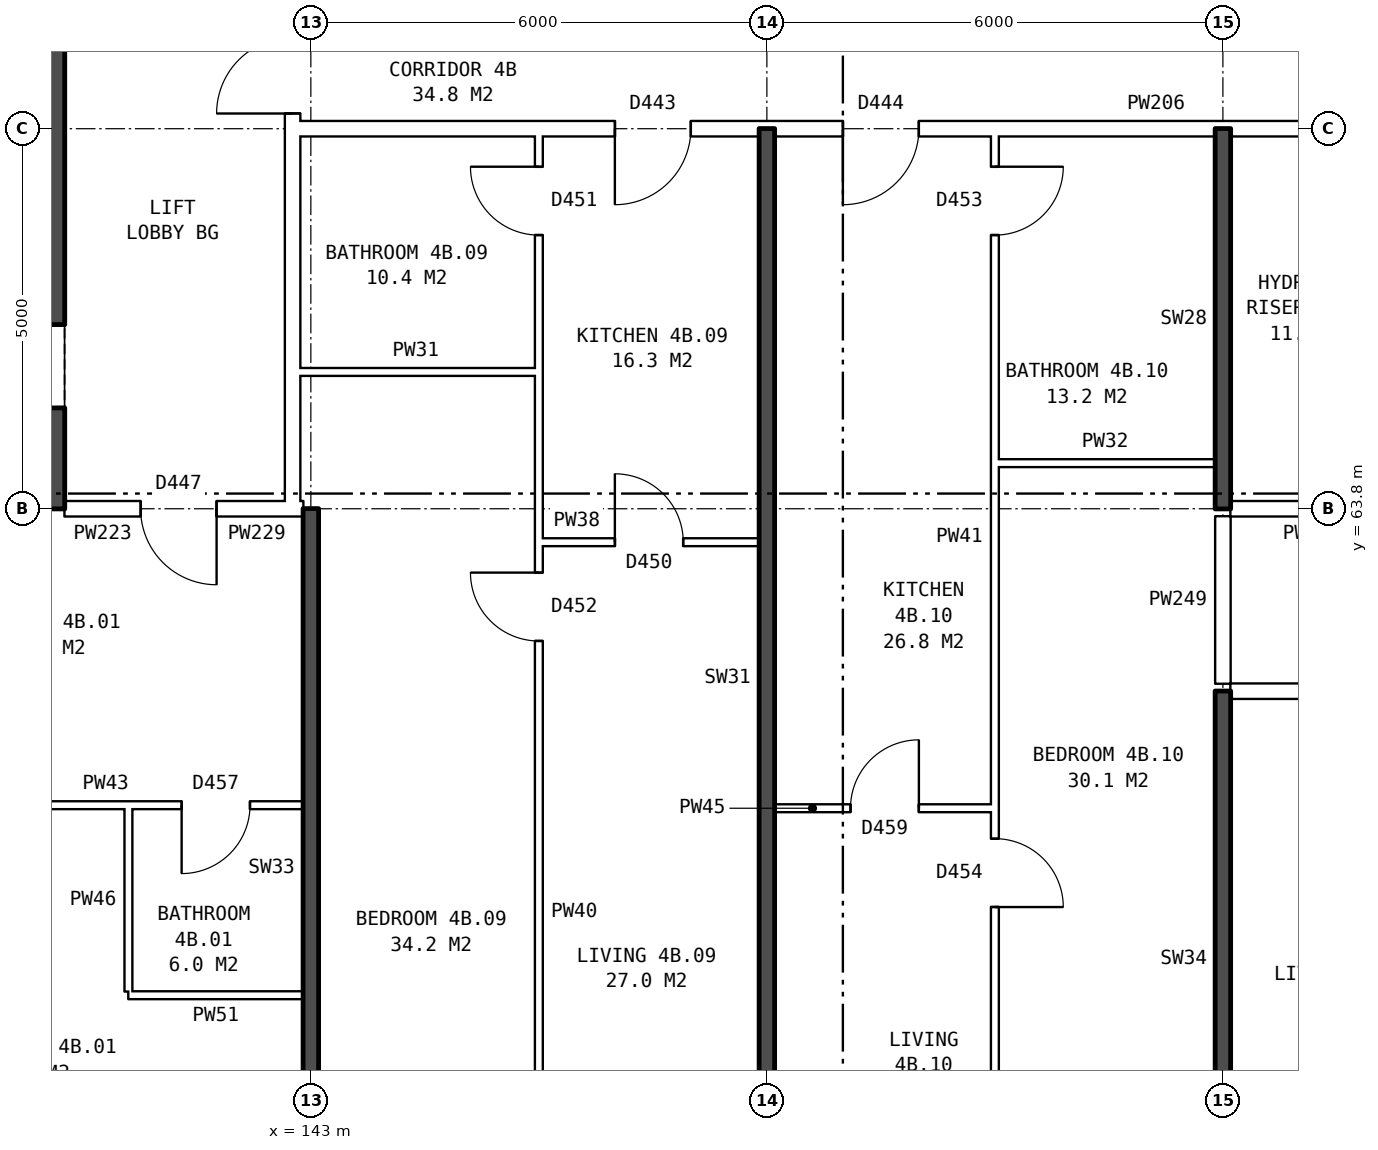
"""IFC4 building model, lengths in metres.
Left out: names, types, materials, properties, quantities, classifications, styles, units other than length and angle.
Written with IfcOpenShell. Run it as: python <this file> out.ifc"""

import sys

from ifc_helpers import new_model, si_unit, direction, frame, frame_2d, origin, place, context, subcontext, project, spatial, rectangle, extrude, element, fill, save


model = new_model("IFC4")
c1 = context("Model", 3, precision=1e-05, world=origin(), true_north=direction((0.0, 1.0)))
c2 = subcontext(c1, "Body", "Model", "MODEL_VIEW")
j1 = project(units=[si_unit("LENGTHUNIT", "METRE"), si_unit("PLANEANGLEUNIT", "RADIAN")], contexts=[c1])
p1 = place(None, origin())
s1 = spatial("IfcSite", under=j1, at=p1, CompositionType="ELEMENT")
p2 = place(p1, origin())
s2 = spatial("IfcBuilding", under=s1, at=p2, CompositionType="ELEMENT")
p3 = place(p2, frame((0.0, 0.0, 19.5)))
s3 = spatial("IfcBuildingStorey", under=s2, at=p3, CompositionType="ELEMENT", Elevation=19.5)
p4 = place(p3, frame((139.31, 64.7, 0.0), z_axis=(0.0, 0.0, 1.0), x_axis=(0.0, 1.0, 0.0)))
e1 = element("IfcWall", 1, at=p4, inside=s3, PredefinedType="SHEAR", context=c2, shape_type="SweptSolid", body=[
    extrude(rectangle(XDim=10.6, YDim=0.9, at=frame_2d((5.3, 0.0))), origin(), (0.0, 0.0, 1.0), 2.85),
])
p5 = place(p4, frame((0.425, 0.0, 0.0)))
e2 = element("IfcOpeningElement", 2, at=p5, cuts=e1, PredefinedType="OPENING", context=c2, shape_type="SweptSolid", body=[
    extrude(rectangle(XDim=1.1, YDim=2.1, at=frame_2d((0.55, 1.05))), frame((0.0, 0.46, 0.0), z_axis=(0.0, -1.0, 0.0), x_axis=(1.0, 0.0, 0.0)), (0.0, 0.0, 1.0), 0.92),
])
p6 = place(p4, frame((9.0, 0.0, 0.0)))
e3 = element("IfcOpeningElement", 3, at=p6, cuts=e1, PredefinedType="OPENING", context=c2, shape_type="SweptSolid", body=[
    extrude(rectangle(XDim=1.1, YDim=2.1, at=frame_2d((0.55, 1.05))), frame((0.0, 0.46, 0.0), z_axis=(0.0, -1.0, 0.0), x_axis=(1.0, 0.0, 0.0)), (0.0, 0.0, 1.0), 0.92),
])
p7 = place(p4, frame((7.225, 0.0, 0.0)))
e4 = element("IfcOpeningElement", 4, at=p7, cuts=e1, PredefinedType="OPENING", context=c2, shape_type="SweptSolid", body=[
    extrude(rectangle(XDim=0.85, YDim=2.1, at=frame_2d((0.425, 1.05))), frame((0.0, 0.46, 0.0), z_axis=(0.0, -1.0, 0.0), x_axis=(1.0, 0.0, 0.0)), (0.0, 0.0, 1.0), 0.92),
])
p8 = place(p3, frame((139.76, 64.25, 0.0), z_axis=(0.0, 0.0, 1.0), x_axis=(-1.0, 0.0, 0.0)))
e5 = element("IfcWall", 5, at=p8, inside=s3, PredefinedType="SHEAR", context=c2, shape_type="SweptSolid", body=[
    extrude(rectangle(XDim=8.4, YDim=0.9, at=frame_2d((4.2, 0.0))), origin(), (0.0, 0.0, 1.0), 2.85),
])
p9 = place(p3, frame((142.76, 63.9, 0.0), z_axis=(0.0, 0.0, 1.0), x_axis=(0.0, 1.0, 0.0)))
e6 = element("IfcWall", 6, at=p9, inside=s3, PredefinedType="PARTITIONING", context=c2, shape_type="SweptSolid", body=[
    extrude(rectangle(XDim=12.2, YDim=0.2, at=frame_2d((6.1, 0.0))), origin(), (0.0, 0.0, 1.0), 2.85),
])
p10 = place(p9, frame((5.1, 0.0, 0.0)))
e7 = element("IfcOpeningElement", 7, at=p10, cuts=e6, PredefinedType="OPENING", context=c2, shape_type="SweptSolid", body=[
    extrude(rectangle(XDim=2.0, YDim=2.1, at=frame_2d((1.0, 1.05))), frame((0.0, 0.11, 0.0), z_axis=(0.0, -1.0, 0.0), x_axis=(1.0, 0.0, 0.0)), (0.0, 0.0, 1.0), 0.22),
])
p11 = place(p3, frame((140.6, 57.4, 0.0), z_axis=(0.0, 0.0, 1.0), x_axis=(1.0, 0.0, 0.0)))
e8 = element("IfcWall", 8, at=p11, inside=s3, PredefinedType="PARTITIONING", context=c2, shape_type="SweptSolid", body=[
    extrude(rectangle(XDim=2.3, YDim=0.1, at=frame_2d((1.15, 0.0))), origin(), (0.0, 0.0, 1.0), 2.85),
])
p12 = place(p3, frame((149.1, 59.86, 0.0), z_axis=(0.0, 0.0, 1.0), x_axis=(1.0, 0.0, 0.0)))
e9 = element("IfcWall", 9, at=p12, inside=s3, PredefinedType="PARTITIONING", context=c2, shape_type="SweptSolid", body=[
    extrude(rectangle(XDim=2.9, YDim=0.1, at=frame_2d((1.45, 0.0))), origin(), (0.0, 0.0, 1.0), 2.85),
])
p13 = place(p12, frame((1.0, 0.0, 0.0)))
e10 = element("IfcOpeningElement", 10, at=p13, cuts=e9, PredefinedType="OPENING", context=c2, shape_type="SweptSolid", body=[
    extrude(rectangle(XDim=0.9, YDim=2.1, at=frame_2d((0.45, 1.05))), frame((0.0, 0.06, 0.0), z_axis=(0.0, -1.0, 0.0), x_axis=(1.0, 0.0, 0.0)), (0.0, 0.0, 1.0), 0.12),
])
p14 = place(p3, frame((137.1, 59.9, 0.0), z_axis=(0.0, 0.0, 1.0), x_axis=(1.0, 0.0, 0.0)))
e11 = element("IfcWall", 11, at=p14, inside=s3, PredefinedType="PARTITIONING", context=c2, shape_type="SweptSolid", body=[
    extrude(rectangle(XDim=5.8, YDim=0.1, at=frame_2d((2.9, 0.0))), origin(), (0.0, 0.0, 1.0), 2.85),
])
p15 = place(p14, frame((1.3, 0.0, 0.0)))
e12 = element("IfcOpeningElement", 12, at=p15, cuts=e11, PredefinedType="OPENING", context=c2, shape_type="SweptSolid", body=[
    extrude(rectangle(XDim=0.9, YDim=2.1, at=frame_2d((0.45, 1.05))), frame((0.0, 0.06, 0.0), z_axis=(0.0, -1.0, 0.0), x_axis=(1.0, 0.0, 0.0)), (0.0, 0.0, 1.0), 0.12),
])
p16 = place(p14, frame((4.2, 0.0, 0.0)))
e13 = element("IfcOpeningElement", 13, at=p16, cuts=e11, PredefinedType="OPENING", context=c2, shape_type="SweptSolid", body=[
    extrude(rectangle(XDim=0.9, YDim=2.1, at=frame_2d((0.45, 1.05))), frame((0.0, 0.06, 0.0), z_axis=(0.0, -1.0, 0.0), x_axis=(1.0, 0.0, 0.0)), (0.0, 0.0, 1.0), 0.12),
])
p17 = place(p3, frame((155.1, 61.4, 0.0), z_axis=(0.0, 0.0, 1.0), x_axis=(1.0, 0.0, 0.0)))
e14 = element("IfcWall", 14, at=p17, inside=s3, PredefinedType="PARTITIONING", context=c2, shape_type="SweptSolid", body=[
    extrude(rectangle(XDim=22.29, YDim=0.2, at=frame_2d((11.145, 0.0))), origin(), (0.0, 0.0, 1.0), 2.85),
])
p18 = place(p17, frame((2.45, 0.0, 0.0)))
e15 = element("IfcOpeningElement", 15, at=p18, cuts=e14, PredefinedType="OPENING", context=c2, shape_type="SweptSolid", body=[
    extrude(rectangle(XDim=1.0, YDim=2.1, at=frame_2d((0.5, 1.05))), frame((0.0, 0.11, 0.0), z_axis=(0.0, -1.0, 0.0), x_axis=(1.0, 0.0, 0.0)), (0.0, 0.0, 1.0), 0.22),
])
p19 = place(p17, frame((14.4, 0.0, 0.0)))
e16 = element("IfcOpeningElement", 16, at=p19, cuts=e14, PredefinedType="OPENING", context=c2, shape_type="SweptSolid", body=[
    extrude(rectangle(XDim=1.0, YDim=2.1, at=frame_2d((0.5, 1.05))), frame((0.0, 0.11, 0.0), z_axis=(0.0, -1.0, 0.0), x_axis=(1.0, 0.0, 0.0)), (0.0, 0.0, 1.0), 0.22),
])
p20 = place(p3, frame((146.0, 63.36, 0.0), z_axis=(0.0, 0.0, 1.0), x_axis=(1.0, 0.0, 0.0)))
e17 = element("IfcWall", 17, at=p20, inside=s3, PredefinedType="PARTITIONING", context=c2, shape_type="SweptSolid", body=[
    extrude(rectangle(XDim=2.9, YDim=0.1, at=frame_2d((1.45, 0.0))), origin(), (0.0, 0.0, 1.0), 2.85),
])
p21 = place(p20, frame((1.0, 0.0, 0.0)))
e18 = element("IfcOpeningElement", 18, at=p21, cuts=e17, PredefinedType="OPENING", context=c2, shape_type="SweptSolid", body=[
    extrude(rectangle(XDim=0.9, YDim=2.1, at=frame_2d((0.45, 1.05))), frame((0.0, 0.06, 0.0), z_axis=(0.0, -1.0, 0.0), x_axis=(1.0, 0.0, 0.0)), (0.0, 0.0, 1.0), 0.12),
])
p22 = place(p3, frame((139.76, 63.8, 0.0), z_axis=(0.0, 0.0, 1.0), x_axis=(1.0, 0.0, 0.0)))
e19 = element("IfcWall", 19, at=p22, inside=s3, PredefinedType="PARTITIONING", context=c2, shape_type="SweptSolid", body=[
    extrude(rectangle(XDim=3.0, YDim=0.2, at=frame_2d((1.5, 0.0))), origin(), (0.0, 0.0, 1.0), 2.85),
])
p23 = place(p22, frame((1.0, 0.0, 0.0)))
e20 = element("IfcOpeningElement", 20, at=p23, cuts=e19, PredefinedType="OPENING", context=c2, shape_type="SweptSolid", body=[
    extrude(rectangle(XDim=1.0, YDim=2.1, at=frame_2d((0.5, 1.05))), frame((0.0, 0.11, 0.0), z_axis=(0.0, -1.0, 0.0), x_axis=(1.0, 0.0, 0.0)), (0.0, 0.0, 1.0), 0.22),
])
p24 = place(p3, frame((142.76, 63.8, 0.0), z_axis=(0.0, 0.0, 1.0), x_axis=(1.0, 0.0, 0.0)))
e21 = element("IfcWall", 21, at=p24, inside=s3, PredefinedType="PARTITIONING", context=c2, shape_type="SweptSolid", body=[
    extrude(rectangle(XDim=0.14, YDim=0.2, at=frame_2d((0.07, 0.0))), origin(), (0.0, 0.0, 1.0), 2.85),
])
p25 = place(p3, frame((155.1, 63.8, 0.0), z_axis=(0.0, 0.0, 1.0), x_axis=(1.0, 0.0, 0.0)))
e22 = element("IfcWall", 22, at=p25, inside=s3, PredefinedType="PARTITIONING", context=c2, shape_type="SweptSolid", body=[
    extrude(rectangle(XDim=2.14, YDim=0.2, at=frame_2d((1.07, 0.0))), origin(), (0.0, 0.0, 1.0), 2.85),
])
p26 = place(p3, frame((152.0, 64.4, 0.0), z_axis=(0.0, 0.0, 1.0), x_axis=(1.0, 0.0, 0.0)))
e23 = element("IfcWall", 23, at=p26, inside=s3, PredefinedType="PARTITIONING", context=c2, shape_type="SweptSolid", body=[
    extrude(rectangle(XDim=2.9, YDim=0.1, at=frame_2d((1.45, 0.0))), origin(), (0.0, 0.0, 1.0), 2.85),
])
p27 = place(p3, frame((142.76, 65.6, 0.0), z_axis=(0.0, 0.0, 1.0), x_axis=(1.0, 0.0, 0.0)))
e24 = element("IfcWall", 24, at=p27, inside=s3, PredefinedType="PARTITIONING", context=c2, shape_type="SweptSolid", body=[
    extrude(rectangle(XDim=3.24, YDim=0.1, at=frame_2d((1.62, 0.0))), origin(), (0.0, 0.0, 1.0), 2.85),
])
p28 = place(p3, frame((142.76, 68.8, 0.0), z_axis=(0.0, 0.0, 1.0), x_axis=(1.0, 0.0, 0.0)))
e25 = element("IfcWall", 25, at=p28, inside=s3, PredefinedType="PARTITIONING", context=c2, shape_type="SweptSolid", body=[
    extrude(rectangle(XDim=14.48, YDim=0.2, at=frame_2d((7.24, 0.0))), origin(), (0.0, 0.0, 1.0), 2.85),
])
p29 = place(p28, frame((4.24, 0.0, 0.0)))
e26 = element("IfcOpeningElement", 26, at=p29, cuts=e25, PredefinedType="OPENING", context=c2, shape_type="SweptSolid", body=[
    extrude(rectangle(XDim=1.0, YDim=2.1, at=frame_2d((0.5, 1.05))), frame((0.0, 0.11, 0.0), z_axis=(0.0, -1.0, 0.0), x_axis=(1.0, 0.0, 0.0)), (0.0, 0.0, 1.0), 0.22),
])
p30 = place(p28, frame((7.24, 0.0, 0.0)))
e27 = element("IfcOpeningElement", 27, at=p30, cuts=e25, PredefinedType="OPENING", context=c2, shape_type="SweptSolid", body=[
    extrude(rectangle(XDim=1.0, YDim=2.1, at=frame_2d((0.5, 1.05))), frame((0.0, 0.11, 0.0), z_axis=(0.0, -1.0, 0.0), x_axis=(1.0, 0.0, 0.0)), (0.0, 0.0, 1.0), 0.22),
])
p31 = place(p3, frame((140.6, 57.45, 0.0), z_axis=(0.0, 0.0, 1.0), x_axis=(0.0, 1.0, 0.0)))
e28 = element("IfcWall", 28, at=p31, inside=s3, PredefinedType="PARTITIONING", context=c2, shape_type="SweptSolid", body=[
    extrude(rectangle(XDim=2.4, YDim=0.1, at=frame_2d((1.2, 0.0))), origin(), (0.0, 0.0, 1.0), 2.85),
])
p32 = place(p3, frame((143.0, 54.36, 0.0), z_axis=(0.0, 0.0, 1.0), x_axis=(0.0, 1.0, 0.0)))
e29 = element("IfcWall", 29, at=p32, inside=s3, PredefinedType="SOLIDWALL", context=c2, shape_type="SweptSolid", body=[
    extrude(rectangle(XDim=9.44, YDim=0.2, at=frame_2d((4.72, 0.0))), origin(), (0.0, 0.0, 1.0), 2.85),
])
p33 = place(p3, frame((146.0, 54.36, 0.0), z_axis=(0.0, 0.0, 1.0), x_axis=(0.0, 1.0, 0.0)))
e30 = element("IfcWall", 30, at=p33, inside=s3, PredefinedType="PARTITIONING", context=c2, shape_type="SweptSolid", body=[
    extrude(rectangle(XDim=14.34, YDim=0.1, at=frame_2d((7.17, 0.0))), origin(), (0.0, 0.0, 1.0), 2.85),
])
p34 = place(p33, frame((7.7, 0.0, 0.0)))
e31 = element("IfcOpeningElement", 31, at=p34, cuts=e30, PredefinedType="OPENING", context=c2, shape_type="SweptSolid", body=[
    extrude(rectangle(XDim=0.9, YDim=2.1, at=frame_2d((0.45, 1.05))), frame((0.0, 0.06, 0.0), z_axis=(0.0, -1.0, 0.0), x_axis=(1.0, 0.0, 0.0)), (0.0, 0.0, 1.0), 0.12),
])
p35 = place(p33, frame((13.04, 0.0, 0.0)))
e32 = element("IfcOpeningElement", 32, at=p35, cuts=e30, PredefinedType="OPENING", context=c2, shape_type="SweptSolid", body=[
    extrude(rectangle(XDim=0.9, YDim=2.1, at=frame_2d((0.45, 1.05))), frame((0.0, 0.06, 0.0), z_axis=(0.0, -1.0, 0.0), x_axis=(1.0, 0.0, 0.0)), (0.0, 0.0, 1.0), 0.12),
])
p36 = place(p3, frame((149.0, 54.36, 0.0), z_axis=(0.0, 0.0, 1.0), x_axis=(0.0, 1.0, 0.0)))
e33 = element("IfcWall", 33, at=p36, inside=s3, PredefinedType="SOLIDWALL", context=c2, shape_type="SweptSolid", body=[
    extrude(rectangle(XDim=14.44, YDim=0.2, at=frame_2d((7.22, 0.0))), origin(), (0.0, 0.0, 1.0), 2.85),
])
p37 = place(p3, frame((152.0, 54.36, 0.0), z_axis=(0.0, 0.0, 1.0), x_axis=(0.0, 1.0, 0.0)))
e34 = element("IfcWall", 34, at=p37, inside=s3, PredefinedType="PARTITIONING", context=c2, shape_type="SweptSolid", body=[
    extrude(rectangle(XDim=14.34, YDim=0.1, at=frame_2d((7.17, 0.0))), origin(), (0.0, 0.0, 1.0), 2.85),
])
p38 = place(p37, frame((4.2, 0.0, 0.0)))
e35 = element("IfcOpeningElement", 35, at=p38, cuts=e34, PredefinedType="OPENING", context=c2, shape_type="SweptSolid", body=[
    extrude(rectangle(XDim=0.9, YDim=2.1, at=frame_2d((0.45, 1.05))), frame((0.0, 0.06, 0.0), z_axis=(0.0, -1.0, 0.0), x_axis=(1.0, 0.0, 0.0)), (0.0, 0.0, 1.0), 0.12),
])
p39 = place(p37, frame((13.04, 0.0, 0.0)))
e36 = element("IfcOpeningElement", 36, at=p39, cuts=e34, PredefinedType="OPENING", context=c2, shape_type="SweptSolid", body=[
    extrude(rectangle(XDim=0.9, YDim=2.1, at=frame_2d((0.45, 1.05))), frame((0.0, 0.06, 0.0), z_axis=(0.0, -1.0, 0.0), x_axis=(1.0, 0.0, 0.0)), (0.0, 0.0, 1.0), 0.12),
])
p40 = place(p3, frame((155.0, 54.36, 0.0), z_axis=(0.0, 0.0, 1.0), x_axis=(0.0, 1.0, 0.0)))
e37 = element("IfcWall", 37, at=p40, inside=s3, PredefinedType="SOLIDWALL", context=c2, shape_type="SweptSolid", body=[
    extrude(rectangle(XDim=7.04, YDim=0.2, at=frame_2d((3.52, 0.0))), origin(), (0.0, 0.0, 1.0), 2.85),
])
p41 = place(p3, frame((155.0, 61.5, 0.0), z_axis=(0.0, 0.0, 1.0), x_axis=(0.0, 1.0, 0.0)))
e38 = element("IfcWall", 38, at=p41, inside=s3, PredefinedType="PARTITIONING", context=c2, shape_type="SweptSolid", body=[
    extrude(rectangle(XDim=2.2, YDim=0.2, at=frame_2d((1.1, 0.0))), origin(), (0.0, 0.0, 1.0), 2.85),
])
p42 = place(p3, frame((155.0, 63.8, 0.0), z_axis=(0.0, 0.0, 1.0), x_axis=(0.0, 1.0, 0.0)))
e39 = element("IfcWall", 39, at=p42, inside=s3, PredefinedType="SOLIDWALL", context=c2, shape_type="SweptSolid", body=[
    extrude(rectangle(XDim=5.0, YDim=0.2, at=frame_2d((2.5, 0.0))), origin(), (0.0, 0.0, 1.0), 2.85),
])
p43 = place(p10, origin())
e40 = element("IfcDoor", 40, at=p43, inside=s3, OperationType="DOUBLE_DOOR_SINGLE_SWING", PredefinedType="DOOR", context=c2, shape_type="SweptSolid", body=[
    extrude(rectangle(XDim=2.0, YDim=2.1, at=frame_2d((1.0, 1.05))), frame((0.0, 0.025, 0.0), z_axis=(0.0, -1.0, 0.0), x_axis=(1.0, 0.0, 0.0)), (0.0, 0.0, 1.0), 0.05),
])
fill(e7, e40)
p44 = place(p23, frame((1.0, 0.0, 0.0), z_axis=(0.0, 0.0, 1.0), x_axis=(-1.0, 0.0, 0.0)))
e41 = element("IfcDoor", 41, at=p44, inside=s3, OperationType="SINGLE_SWING_LEFT", PredefinedType="DOOR", context=c2, shape_type="SweptSolid", body=[
    extrude(rectangle(XDim=1.0, YDim=2.1, at=frame_2d((0.5, 1.05))), frame((0.0, 0.025, 0.0), z_axis=(0.0, -1.0, 0.0), x_axis=(1.0, 0.0, 0.0)), (0.0, 0.0, 1.0), 0.05),
])
fill(e20, e41)
p45 = place(p16, frame((0.9, 0.0, 0.0), z_axis=(0.0, 0.0, 1.0), x_axis=(-1.0, 0.0, 0.0)))
e42 = element("IfcDoor", 42, at=p45, inside=s3, OperationType="SINGLE_SWING_RIGHT", PredefinedType="DOOR", context=c2, shape_type="SweptSolid", body=[
    extrude(rectangle(XDim=0.9, YDim=2.1, at=frame_2d((0.45, 1.05))), frame((0.0, 0.025, 0.0), z_axis=(0.0, -1.0, 0.0), x_axis=(1.0, 0.0, 0.0)), (0.0, 0.0, 1.0), 0.05),
])
fill(e13, e42)
p46 = place(p34, origin())
e43 = element("IfcDoor", 43, at=p46, inside=s3, OperationType="SINGLE_SWING_RIGHT", PredefinedType="DOOR", context=c2, shape_type="SweptSolid", body=[
    extrude(rectangle(XDim=0.9, YDim=2.1, at=frame_2d((0.45, 1.05))), frame((0.0, 0.025, 0.0), z_axis=(0.0, -1.0, 0.0), x_axis=(1.0, 0.0, 0.0)), (0.0, 0.0, 1.0), 0.05),
])
fill(e31, e43)
p47 = place(p29, frame((1.0, 0.0, 0.0), z_axis=(0.0, 0.0, 1.0), x_axis=(-1.0, 0.0, 0.0)))
e44 = element("IfcDoor", 44, at=p47, inside=s3, OperationType="SINGLE_SWING_RIGHT", PredefinedType="DOOR", context=c2, shape_type="SweptSolid", body=[
    extrude(rectangle(XDim=1.0, YDim=2.1, at=frame_2d((0.5, 1.05))), frame((0.0, 0.025, 0.0), z_axis=(0.0, -1.0, 0.0), x_axis=(1.0, 0.0, 0.0)), (0.0, 0.0, 1.0), 0.05),
])
fill(e26, e44)
p48 = place(p21, origin())
e45 = element("IfcDoor", 45, at=p48, inside=s3, OperationType="SINGLE_SWING_LEFT", PredefinedType="DOOR", context=c2, shape_type="SweptSolid", body=[
    extrude(rectangle(XDim=0.9, YDim=2.1, at=frame_2d((0.45, 1.05))), frame((0.0, 0.025, 0.0), z_axis=(0.0, -1.0, 0.0), x_axis=(1.0, 0.0, 0.0)), (0.0, 0.0, 1.0), 0.05),
])
fill(e18, e45)
p49 = place(p35, origin())
e46 = element("IfcDoor", 46, at=p49, inside=s3, OperationType="SINGLE_SWING_RIGHT", PredefinedType="DOOR", context=c2, shape_type="SweptSolid", body=[
    extrude(rectangle(XDim=0.9, YDim=2.1, at=frame_2d((0.45, 1.05))), frame((0.0, 0.025, 0.0), z_axis=(0.0, -1.0, 0.0), x_axis=(1.0, 0.0, 0.0)), (0.0, 0.0, 1.0), 0.05),
])
fill(e32, e46)
p50 = place(p38, frame((0.9, 0.0, 0.0), z_axis=(0.0, 0.0, 1.0), x_axis=(-1.0, 0.0, 0.0)))
e47 = element("IfcDoor", 47, at=p50, inside=s3, OperationType="SINGLE_SWING_RIGHT", PredefinedType="DOOR", context=c2, shape_type="SweptSolid", body=[
    extrude(rectangle(XDim=0.9, YDim=2.1, at=frame_2d((0.45, 1.05))), frame((0.0, 0.025, 0.0), z_axis=(0.0, -1.0, 0.0), x_axis=(1.0, 0.0, 0.0)), (0.0, 0.0, 1.0), 0.05),
])
fill(e35, e47)
p51 = place(p30, frame((1.0, 0.0, 0.0), z_axis=(0.0, 0.0, 1.0), x_axis=(-1.0, 0.0, 0.0)))
e48 = element("IfcDoor", 48, at=p51, inside=s3, OperationType="SINGLE_SWING_RIGHT", PredefinedType="DOOR", context=c2, shape_type="SweptSolid", body=[
    extrude(rectangle(XDim=1.0, YDim=2.1, at=frame_2d((0.5, 1.05))), frame((0.0, 0.025, 0.0), z_axis=(0.0, -1.0, 0.0), x_axis=(1.0, 0.0, 0.0)), (0.0, 0.0, 1.0), 0.05),
])
fill(e27, e48)
p52 = place(p13, origin())
e49 = element("IfcDoor", 49, at=p52, inside=s3, OperationType="SINGLE_SWING_RIGHT", PredefinedType="DOOR", context=c2, shape_type="SweptSolid", body=[
    extrude(rectangle(XDim=0.9, YDim=2.1, at=frame_2d((0.45, 1.05))), frame((0.0, 0.025, 0.0), z_axis=(0.0, -1.0, 0.0), x_axis=(1.0, 0.0, 0.0)), (0.0, 0.0, 1.0), 0.05),
])
fill(e10, e49)
p53 = place(p39, frame((0.9, 0.0, 0.0), z_axis=(0.0, 0.0, 1.0), x_axis=(-1.0, 0.0, 0.0)))
e50 = element("IfcDoor", 50, at=p53, inside=s3, OperationType="SINGLE_SWING_LEFT", PredefinedType="DOOR", context=c2, shape_type="SweptSolid", body=[
    extrude(rectangle(XDim=0.9, YDim=2.1, at=frame_2d((0.45, 1.05))), frame((0.0, 0.025, 0.0), z_axis=(0.0, -1.0, 0.0), x_axis=(1.0, 0.0, 0.0)), (0.0, 0.0, 1.0), 0.05),
])
fill(e36, e50)
save(model, sys.argv[1])
